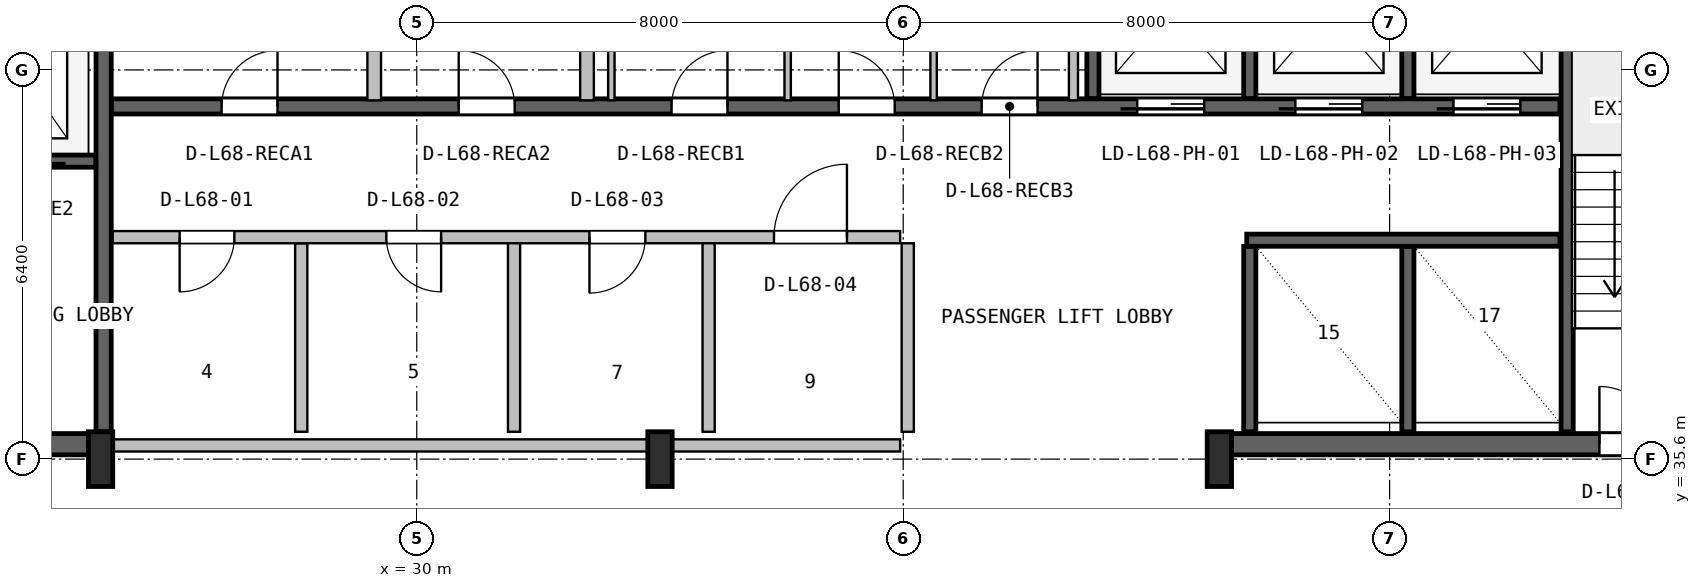
"""IFC4 building model, lengths in metres.
Left out: names, types, materials, properties, quantities, classifications, styles, units other than length and angle.
Written with IfcOpenShell. Run it as: python <this file> out.ifc"""

import sys

from ifc_helpers import new_model, si_unit, direction, frame, frame_2d, origin, origin_2d, place, context, subcontext, project, spatial, rectangle, i_section, extrude, source, transform, mapped, element, fill, save


model = new_model("IFC4")
c1 = context("Model", 3, precision=1e-05, world=origin(), true_north=direction((0.0, 1.0)))
c2 = subcontext(c1, "Body", "Model", "MODEL_VIEW")
j1 = project(units=[si_unit("LENGTHUNIT", "METRE"), si_unit("PLANEANGLEUNIT", "RADIAN")], contexts=[c1])
p1 = place(None, origin())
s1 = spatial("IfcSite", under=j1, at=p1, CompositionType="ELEMENT")
p2 = place(p1, origin())
s2 = spatial("IfcBuilding", under=s1, at=p2, CompositionType="ELEMENT")
p3 = place(p2, frame((0.0, 0.0, 273.6)))
s3 = spatial("IfcBuildingStorey", under=s2, at=p3, CompositionType="ELEMENT", Elevation=273.6)
p4 = place(p3, frame((15.67, 35.845, 0.0), z_axis=(0.0, 0.0, 1.0), x_axis=(1.0, 0.0, 0.0)))
e1 = element("IfcWall", 1, at=p4, inside=s3, PredefinedType="SHEAR", context=c2, shape_type="SweptSolid", body=[
    extrude(rectangle(XDim=9.13, YDim=0.35, at=frame_2d((4.565, 0.0))), origin(), (0.0, 0.0, 1.0), 3.55),
])
p5 = place(p4, frame((5.4, 0.0, 0.0)))
e2 = element("IfcOpeningElement", 2, at=p5, cuts=e1, PredefinedType="OPENING", context=c2, shape_type="SweptSolid", body=[
    extrude(rectangle(XDim=1.0, YDim=2.1, at=frame_2d((0.5, 1.05))), frame((0.0, 0.185, 0.0), z_axis=(0.0, -1.0, 0.0), x_axis=(1.0, 0.0, 0.0)), (0.0, 0.0, 1.0), 0.37),
])
p6 = place(p3, frame((43.2, 35.845, 0.0), z_axis=(0.0, 0.0, 1.0), x_axis=(1.0, 0.0, 0.0)))
e3 = element("IfcWall", 3, at=p6, inside=s3, PredefinedType="SHEAR", context=c2, shape_type="SweptSolid", body=[
    extrude(rectangle(XDim=9.13, YDim=0.35, at=frame_2d((4.565, 0.0))), origin(), (0.0, 0.0, 1.0), 3.55),
])
p7 = place(p6, frame((6.25, 0.0, 0.0)))
e4 = element("IfcOpeningElement", 4, at=p7, cuts=e3, PredefinedType="OPENING", context=c2, shape_type="SweptSolid", body=[
    extrude(rectangle(XDim=0.95, YDim=2.1, at=frame_2d((0.475, 1.05))), frame((0.0, 0.185, 0.0), z_axis=(0.0, -1.0, 0.0), x_axis=(1.0, 0.0, 0.0)), (0.0, 0.0, 1.0), 0.37),
])
m1 = source(origin(), c2, "Body", "SweptSolid", [
    extrude(i_section(OverallWidth=0.4, OverallDepth=0.9, WebThickness=0.016, FlangeThickness=0.028, FilletRadius=0.016, at=origin_2d()), origin(), (0.0, 0.0, 1.0), 3.8),
])
for number, where, z_axis, x_axis in (
    (5, (24.8, 35.6, 0.0), (0.0, 0.0, 1.0), (1.0, 0.0, 0.0)),
    (6, (34.0, 35.6, 0.0), (0.0, 0.0, 1.0), (1.0, 0.0, 0.0)),
    (7, (43.2, 35.6, 0.0), (0.0, 0.0, 1.0), (1.0, 0.0, 0.0)),
):
    element("IfcColumn", number, at=place(p3, frame(where, z_axis=z_axis, x_axis=x_axis)), inside=s3, PredefinedType="COLUMN", context=c2, shape_type="MappedRepresentation", body=[
        mapped(m1, transform((0.0, 0.0, 0.0), x_axis=(1.0, 0.0, 0.0), y_axis=(0.0, 1.0, 0.0), z_axis=(0.0, 0.0, 1.0), scale=1.0)),
    ])
p8 = place(p3, frame((24.85, 36.05, 0.0), z_axis=(0.0, 0.0, 1.0), x_axis=(0.0, 1.0, 0.0)))
e8 = element("IfcWall", 8, at=p8, inside=s3, PredefinedType="SHEAR", context=c2, shape_type="SweptSolid", body=[
    extrude(rectangle(XDim=10.45, YDim=0.25, at=frame_2d((5.225, 0.0))), origin(), (0.0, 0.0, 1.0), 3.55),
])
p9 = place(p3, frame((19.2, 40.5, 0.0), z_axis=(0.0, 0.0, 1.0), x_axis=(1.0, 0.0, 0.0)))
e9 = element("IfcWall", 9, at=p9, inside=s3, PredefinedType="SHEAR", context=c2, shape_type="SweptSolid", body=[
    extrude(rectangle(XDim=5.52, YDim=0.2, at=frame_2d((2.76, 0.0))), origin(), (0.0, 0.0, 1.0), 3.55),
])
p10 = place(p9, frame((1.05, 0.0, 0.0)))
e10 = element("IfcOpeningElement", 10, at=p10, cuts=e9, PredefinedType="OPENING", context=c2, shape_type="SweptSolid", body=[
    extrude(rectangle(XDim=1.1, YDim=2.18, at=frame_2d((0.55, 1.09))), frame((0.0, 0.11, 0.0), z_axis=(0.0, -1.0, 0.0), x_axis=(1.0, 0.0, 0.0)), (0.0, 0.0, 1.0), 0.22),
])
p11 = place(p9, frame((3.65, 0.0, 0.0)))
e11 = element("IfcOpeningElement", 11, at=p11, cuts=e9, PredefinedType="OPENING", context=c2, shape_type="SweptSolid", body=[
    extrude(rectangle(XDim=1.1, YDim=2.18, at=frame_2d((0.55, 1.09))), frame((0.0, 0.11, 0.0), z_axis=(0.0, -1.0, 0.0), x_axis=(1.0, 0.0, 0.0)), (0.0, 0.0, 1.0), 0.22),
])
p12 = place(p3, frame((48.92, 36.05, 0.0), z_axis=(0.0, 0.0, 1.0), x_axis=(0.0, 1.0, 0.0)))
e12 = element("IfcWall", 12, at=p12, inside=s3, PredefinedType="SHEAR", context=c2, shape_type="SweptSolid", body=[
    extrude(rectangle(XDim=10.5, YDim=0.2, at=frame_2d((5.25, 0.0))), origin(), (0.0, 0.0, 1.0), 3.55),
])
p13 = place(p3, frame((24.98, 41.4, 0.0), z_axis=(0.0, 0.0, 1.0), x_axis=(1.0, 0.0, 0.0)))
e13 = element("IfcWall", 13, at=p13, inside=s3, PredefinedType="SHEAR", context=c2, shape_type="SweptSolid", body=[
    extrude(rectangle(XDim=23.82, YDim=0.25, at=frame_2d((11.91, 0.0))), origin(), (0.0, 0.0, 1.0), 3.55),
])
p14 = place(p13, frame((16.87, 0.0, 0.0)))
e14 = element("IfcOpeningElement", 14, at=p14, cuts=e13, PredefinedType="OPENING", context=c2, shape_type="SweptSolid", body=[
    extrude(rectangle(XDim=1.1, YDim=2.18, at=frame_2d((0.55, 1.09))), frame((0.0, 0.135, 0.0), z_axis=(0.0, -1.0, 0.0), x_axis=(1.0, 0.0, 0.0)), (0.0, 0.0, 1.0), 0.27),
])
p15 = place(p13, frame((19.47, 0.0, 0.0)))
e15 = element("IfcOpeningElement", 15, at=p15, cuts=e13, PredefinedType="OPENING", context=c2, shape_type="SweptSolid", body=[
    extrude(rectangle(XDim=1.1, YDim=2.18, at=frame_2d((0.55, 1.09))), frame((0.0, 0.135, 0.0), z_axis=(0.0, -1.0, 0.0), x_axis=(1.0, 0.0, 0.0)), (0.0, 0.0, 1.0), 0.27),
])
p16 = place(p13, frame((22.07, 0.0, 0.0)))
e16 = element("IfcOpeningElement", 16, at=p16, cuts=e13, PredefinedType="OPENING", context=c2, shape_type="SweptSolid", body=[
    extrude(rectangle(XDim=1.1, YDim=2.18, at=frame_2d((0.55, 1.09))), frame((0.0, 0.135, 0.0), z_axis=(0.0, -1.0, 0.0), x_axis=(1.0, 0.0, 0.0)), (0.0, 0.0, 1.0), 0.27),
])
p17 = place(p13, frame((1.81, 0.0, 0.0)))
e17 = element("IfcOpeningElement", 17, at=p17, cuts=e13, PredefinedType="OPENING", context=c2, shape_type="SweptSolid", body=[
    extrude(rectangle(XDim=0.92, YDim=2.08, at=frame_2d((0.46, 1.04))), frame((0.0, 0.135, 0.0), z_axis=(0.0, -1.0, 0.0), x_axis=(1.0, 0.0, 0.0)), (0.0, 0.0, 1.0), 0.27),
])
p18 = place(p13, frame((5.71, 0.0, 0.0)))
e18 = element("IfcOpeningElement", 18, at=p18, cuts=e13, PredefinedType="OPENING", context=c2, shape_type="SweptSolid", body=[
    extrude(rectangle(XDim=0.92, YDim=2.08, at=frame_2d((0.46, 1.04))), frame((0.0, 0.135, 0.0), z_axis=(0.0, -1.0, 0.0), x_axis=(1.0, 0.0, 0.0)), (0.0, 0.0, 1.0), 0.27),
])
p19 = place(p13, frame((9.21, 0.0, 0.0)))
e19 = element("IfcOpeningElement", 19, at=p19, cuts=e13, PredefinedType="OPENING", context=c2, shape_type="SweptSolid", body=[
    extrude(rectangle(XDim=0.92, YDim=2.08, at=frame_2d((0.46, 1.04))), frame((0.0, 0.135, 0.0), z_axis=(0.0, -1.0, 0.0), x_axis=(1.0, 0.0, 0.0)), (0.0, 0.0, 1.0), 0.27),
])
p20 = place(p13, frame((11.96, 0.0, 0.0)))
e20 = element("IfcOpeningElement", 20, at=p20, cuts=e13, PredefinedType="OPENING", context=c2, shape_type="SweptSolid", body=[
    extrude(rectangle(XDim=0.92, YDim=2.08, at=frame_2d((0.46, 1.04))), frame((0.0, 0.135, 0.0), z_axis=(0.0, -1.0, 0.0), x_axis=(1.0, 0.0, 0.0)), (0.0, 0.0, 1.0), 0.27),
])
p21 = place(p13, frame((14.31, 0.0, 0.0)))
e21 = element("IfcOpeningElement", 21, at=p21, cuts=e13, PredefinedType="OPENING", context=c2, shape_type="SweptSolid", body=[
    extrude(rectangle(XDim=0.92, YDim=2.08, at=frame_2d((0.46, 1.04))), frame((0.0, 0.135, 0.0), z_axis=(0.0, -1.0, 0.0), x_axis=(1.0, 0.0, 0.0)), (0.0, 0.0, 1.0), 0.27),
])
p22 = place(p3, frame((41.12, 41.53, 0.0), z_axis=(0.0, 0.0, 1.0), x_axis=(0.0, 1.0, 0.0)))
e22 = element("IfcWall", 22, at=p22, inside=s3, PredefinedType="SHEAR", context=c2, shape_type="SweptSolid", body=[
    extrude(rectangle(XDim=5.02, YDim=0.2, at=frame_2d((2.51, 0.0))), origin(), (0.0, 0.0, 1.0), 3.55),
])
for number, where, z_axis, x_axis in (
    (23, (43.7, 41.53, 0.0), (0.0, 0.0, 1.0), (0.0, 1.0, 0.0)),
    (24, (46.3, 41.53, 0.0), (0.0, 0.0, 1.0), (0.0, 1.0, 0.0)),
):
    element("IfcWall", number, at=place(p3, frame(where, z_axis=z_axis, x_axis=x_axis)), inside=s3, PredefinedType="SHEAR", context=c2, shape_type="SweptSolid", body=[
        extrude(rectangle(XDim=2.87, YDim=0.2, at=frame_2d((1.435, 0.0))), origin(), (0.0, 0.0, 1.0), 3.55),
    ])
for number, where, z_axis, x_axis in (
    (25, (43.7, 36.05, 0.0), (0.0, 0.0, 1.0), (0.0, 1.0, 0.0)),
    (26, (46.3, 36.05, 0.0), (0.0, 0.0, 1.0), (0.0, 1.0, 0.0)),
):
    element("IfcWall", number, at=place(p3, frame(where, z_axis=z_axis, x_axis=x_axis)), inside=s3, PredefinedType="SHEAR", context=c2, shape_type="SweptSolid", body=[
        extrude(rectangle(XDim=3.05, YDim=0.2, at=frame_2d((1.525, 0.0))), origin(), (0.0, 0.0, 1.0), 3.55),
    ])
p23 = place(p3, frame((43.65, 39.2, 0.0), z_axis=(0.0, 0.0, 1.0), x_axis=(1.0, 0.0, 0.0)))
e27 = element("IfcWall", 27, at=p23, inside=s3, PredefinedType="SHEAR", context=c2, shape_type="SweptSolid", body=[
    extrude(rectangle(XDim=5.15, YDim=0.2, at=frame_2d((2.575, 0.0))), origin(), (0.0, 0.0, 1.0), 3.55),
])
p24 = place(p3, frame((25.0, 35.825, 0.0), z_axis=(0.0, 0.0, 1.0), x_axis=(1.0, 0.0, 0.0)))
e28 = element("IfcWall", 28, at=p24, inside=s3, PredefinedType="SOLIDWALL", context=c2, shape_type="SweptSolid", body=[
    extrude(rectangle(XDim=12.95, YDim=0.2, at=frame_2d((6.475, 0.0))), origin(), (0.0, 0.0, 1.0), 2.575),
])
p25 = place(p3, frame((28.1, 36.05, 0.0), z_axis=(0.0, 0.0, 1.0), x_axis=(0.0, 1.0, 0.0)))
e29 = element("IfcWall", 29, at=p25, inside=s3, PredefinedType="PLUMBINGWALL", context=c2, shape_type="SweptSolid", body=[
    extrude(rectangle(XDim=3.1, YDim=0.2, at=frame_2d((1.55, 0.0))), origin(), (0.0, 0.0, 1.0), 3.53),
])
p26 = place(p3, frame((25.0, 39.25, 0.0), z_axis=(0.0, 0.0, 1.0), x_axis=(1.0, 0.0, 0.0)))
e30 = element("IfcWall", 30, at=p26, inside=s3, PredefinedType="SOLIDWALL", context=c2, shape_type="SweptSolid", body=[
    extrude(rectangle(XDim=12.95, YDim=0.2, at=frame_2d((6.475, 0.0))), origin(), (0.0, 0.0, 1.0), 3.53),
])
p27 = place(p26, frame((1.1, 0.0, 0.0)))
e31 = element("IfcOpeningElement", 31, at=p27, cuts=e30, PredefinedType="OPENING", context=c2, shape_type="SweptSolid", body=[
    extrude(rectangle(XDim=0.9, YDim=2.06, at=frame_2d((0.45, 1.03))), frame((0.0, 0.11, 0.0), z_axis=(0.0, -1.0, 0.0), x_axis=(1.0, 0.0, 0.0)), (0.0, 0.0, 1.0), 0.22),
])
p28 = place(p26, frame((4.5, 0.0, 0.0)))
e32 = element("IfcOpeningElement", 32, at=p28, cuts=e30, PredefinedType="OPENING", context=c2, shape_type="SweptSolid", body=[
    extrude(rectangle(XDim=0.9, YDim=2.06, at=frame_2d((0.45, 1.03))), frame((0.0, 0.11, 0.0), z_axis=(0.0, -1.0, 0.0), x_axis=(1.0, 0.0, 0.0)), (0.0, 0.0, 1.0), 0.22),
])
p29 = place(p26, frame((7.84, 0.0, 0.0)))
e33 = element("IfcOpeningElement", 33, at=p29, cuts=e30, PredefinedType="OPENING", context=c2, shape_type="SweptSolid", body=[
    extrude(rectangle(XDim=0.92, YDim=2.08, at=frame_2d((0.46, 1.04))), frame((0.0, 0.11, 0.0), z_axis=(0.0, -1.0, 0.0), x_axis=(1.0, 0.0, 0.0)), (0.0, 0.0, 1.0), 0.22),
])
p30 = place(p26, frame((10.875, 0.0, 0.0)))
e34 = element("IfcOpeningElement", 34, at=p30, cuts=e30, PredefinedType="OPENING", context=c2, shape_type="SweptSolid", body=[
    extrude(rectangle(XDim=1.2, YDim=2.1, at=frame_2d((0.6, 1.05))), frame((0.0, 0.11, 0.0), z_axis=(0.0, -1.0, 0.0), x_axis=(1.0, 0.0, 0.0)), (0.0, 0.0, 1.0), 0.22),
])
p31 = place(p3, frame((31.6, 36.05, 0.0), z_axis=(0.0, 0.0, 1.0), x_axis=(0.0, 1.0, 0.0)))
e35 = element("IfcWall", 35, at=p31, inside=s3, PredefinedType="PLUMBINGWALL", context=c2, shape_type="SweptSolid", body=[
    extrude(rectangle(XDim=3.1, YDim=0.2, at=frame_2d((1.55, 0.0))), origin(), (0.0, 0.0, 1.0), 3.53),
])
for number, where, z_axis, x_axis in (
    (36, (34.8, 36.05, 0.0), (0.0, 0.0, 1.0), (0.0, 1.0, 0.0)),
    (37, (38.075, 36.05, 0.0), (0.0, 0.0, 1.0), (0.0, 1.0, 0.0)),
):
    element("IfcWall", number, at=place(p3, frame(where, z_axis=z_axis, x_axis=x_axis)), inside=s3, PredefinedType="SOLIDWALL", context=c2, shape_type="SweptSolid", body=[
        extrude(rectangle(XDim=3.1, YDim=0.2, at=frame_2d((1.55, 0.0))), origin(), (0.0, 0.0, 1.0), 3.53),
    ])
p32 = place(p3, frame((29.3, 41.5, 0.0), z_axis=(0.0, 0.0, 1.0), x_axis=(0.0, 1.0, 0.0)))
e38 = element("IfcWall", 38, at=p32, inside=s3, PredefinedType="PARTITIONING", context=c2, shape_type="SweptSolid", body=[
    extrude(rectangle(XDim=2.288, YDim=0.225, at=frame_2d((1.144, 0.0))), origin(), (0.0, 0.0, 1.0), 3.53),
])
p33 = place(p3, frame((32.8, 41.5, 0.0), z_axis=(0.0, 0.0, 1.0), x_axis=(0.0, 1.0, 0.0)))
e39 = element("IfcWall", 39, at=p33, inside=s3, PredefinedType="PARTITIONING", context=c2, shape_type="SweptSolid", body=[
    extrude(rectangle(XDim=5.02, YDim=0.225, at=frame_2d((2.51, 0.0))), origin(), (0.0, 0.0, 1.0), 3.53),
])
for number, where, z_axis, x_axis in (
    (40, (36.1, 41.5, 0.0), (0.0, 0.0, 1.0), (0.0, 1.0, 0.0)),
    (41, (33.2, 41.5, 0.0), (0.0, 0.0, 1.0), (0.0, 1.0, 0.0)),
    (42, (38.5, 41.5, 0.0), (0.0, 0.0, 1.0), (0.0, 1.0, 0.0)),
):
    element("IfcWall", number, at=place(p3, frame(where, z_axis=z_axis, x_axis=x_axis)), inside=s3, PredefinedType="PARTITIONING", context=c2, shape_type="SweptSolid", body=[
        extrude(rectangle(XDim=5.02, YDim=0.105, at=frame_2d((2.51, 0.0))), origin(), (0.0, 0.0, 1.0), 3.53),
    ])
p34 = place(p3, frame((40.8, 41.5, 0.0), z_axis=(0.0, 0.0, 1.0), x_axis=(0.0, 1.0, 0.0)))
e43 = element("IfcWall", 43, at=p34, inside=s3, PredefinedType="PARTITIONING", context=c2, shape_type="SweptSolid", body=[
    extrude(rectangle(XDim=5.02, YDim=0.15, at=frame_2d((2.51, 0.0))), origin(), (0.0, 0.0, 1.0), 3.53),
])
m2 = source(origin(), c2, "Body", "SweptSolid", [
    extrude(rectangle(XDim=0.95, YDim=2.1, at=frame_2d((0.475, 1.05))), frame((0.0, 0.025, 0.0), z_axis=(0.0, -1.0, 0.0), x_axis=(1.0, 0.0, 0.0)), (0.0, 0.0, 1.0), 0.05),
])
p35 = place(p7, origin())
e44 = element("IfcDoor", 44, at=p35, inside=s3, OperationType="SINGLE_SWING_LEFT", PredefinedType="DOOR", context=c2, shape_type="MappedRepresentation", body=[
    mapped(m2, transform((0.0, 0.0, 0.0), x_axis=(1.0, 0.0, 0.0), y_axis=(0.0, 1.0, 0.0), z_axis=(0.0, 0.0, 1.0), scale=1.0)),
])
fill(e4, e44)
m3 = source(origin(), c2, "Body", "SweptSolid", [
    extrude(rectangle(XDim=1.1, YDim=2.18, at=frame_2d((0.55, 1.09))), frame((0.0, 0.025, 0.0), z_axis=(0.0, -1.0, 0.0), x_axis=(1.0, 0.0, 0.0)), (0.0, 0.0, 1.0), 0.05),
])
p36 = place(p14, frame((1.1, 0.0, 0.0), z_axis=(0.0, 0.0, 1.0), x_axis=(-1.0, 0.0, 0.0)))
e45 = element("IfcDoor", 45, at=p36, inside=s3, OperationType="SLIDING_TO_LEFT", PredefinedType="DOOR", context=c2, shape_type="MappedRepresentation", body=[
    mapped(m3, transform((0.0, 0.0, 0.0), x_axis=(1.0, 0.0, 0.0), y_axis=(0.0, 1.0, 0.0), z_axis=(0.0, 0.0, 1.0), scale=1.0)),
])
fill(e14, e45)
p37 = place(p15, frame((1.1, 0.0, 0.0), z_axis=(0.0, 0.0, 1.0), x_axis=(-1.0, 0.0, 0.0)))
e46 = element("IfcDoor", 46, at=p37, inside=s3, OperationType="SLIDING_TO_LEFT", PredefinedType="DOOR", context=c2, shape_type="MappedRepresentation", body=[
    mapped(m3, transform((0.0, 0.0, 0.0), x_axis=(1.0, 0.0, 0.0), y_axis=(0.0, 1.0, 0.0), z_axis=(0.0, 0.0, 1.0), scale=1.0)),
])
fill(e15, e46)
p38 = place(p16, frame((1.1, 0.0, 0.0), z_axis=(0.0, 0.0, 1.0), x_axis=(-1.0, 0.0, 0.0)))
e47 = element("IfcDoor", 47, at=p38, inside=s3, OperationType="SLIDING_TO_LEFT", PredefinedType="DOOR", context=c2, shape_type="MappedRepresentation", body=[
    mapped(m3, transform((0.0, 0.0, 0.0), x_axis=(1.0, 0.0, 0.0), y_axis=(0.0, 1.0, 0.0), z_axis=(0.0, 0.0, 1.0), scale=1.0)),
])
fill(e16, e47)
m4 = source(origin(), c2, "Body", "SweptSolid", [
    extrude(rectangle(XDim=0.92, YDim=2.08, at=frame_2d((0.46, 1.04))), frame((0.0, 0.025, 0.0), z_axis=(0.0, -1.0, 0.0), x_axis=(1.0, 0.0, 0.0)), (0.0, 0.0, 1.0), 0.05),
])
p39 = place(p17, origin())
e48 = element("IfcDoor", 48, at=p39, inside=s3, OperationType="SINGLE_SWING_RIGHT", PredefinedType="DOOR", context=c2, shape_type="MappedRepresentation", body=[
    mapped(m4, transform((0.0, 0.0, 0.0), x_axis=(1.0, 0.0, 0.0), y_axis=(0.0, 1.0, 0.0), z_axis=(0.0, 0.0, 1.0), scale=1.0)),
])
fill(e17, e48)
p40 = place(p18, origin())
e49 = element("IfcDoor", 49, at=p40, inside=s3, OperationType="SINGLE_SWING_LEFT", PredefinedType="DOOR", context=c2, shape_type="MappedRepresentation", body=[
    mapped(m4, transform((0.0, 0.0, 0.0), x_axis=(1.0, 0.0, 0.0), y_axis=(0.0, 1.0, 0.0), z_axis=(0.0, 0.0, 1.0), scale=1.0)),
])
fill(e18, e49)
p41 = place(p19, origin())
e50 = element("IfcDoor", 50, at=p41, inside=s3, OperationType="SINGLE_SWING_RIGHT", PredefinedType="DOOR", context=c2, shape_type="MappedRepresentation", body=[
    mapped(m4, transform((0.0, 0.0, 0.0), x_axis=(1.0, 0.0, 0.0), y_axis=(0.0, 1.0, 0.0), z_axis=(0.0, 0.0, 1.0), scale=1.0)),
])
fill(e19, e50)
p42 = place(p20, origin())
e51 = element("IfcDoor", 51, at=p42, inside=s3, OperationType="SINGLE_SWING_LEFT", PredefinedType="DOOR", context=c2, shape_type="MappedRepresentation", body=[
    mapped(m4, transform((0.0, 0.0, 0.0), x_axis=(1.0, 0.0, 0.0), y_axis=(0.0, 1.0, 0.0), z_axis=(0.0, 0.0, 1.0), scale=1.0)),
])
fill(e20, e51)
p43 = place(p21, origin())
e52 = element("IfcDoor", 52, at=p43, inside=s3, OperationType="SINGLE_SWING_RIGHT", PredefinedType="DOOR", context=c2, shape_type="MappedRepresentation", body=[
    mapped(m4, transform((0.0, 0.0, 0.0), x_axis=(1.0, 0.0, 0.0), y_axis=(0.0, 1.0, 0.0), z_axis=(0.0, 0.0, 1.0), scale=1.0)),
])
fill(e21, e52)
m5 = source(origin(), c2, "Body", "SweptSolid", [
    extrude(rectangle(XDim=0.9, YDim=2.06, at=frame_2d((0.45, 1.03))), frame((0.0, 0.025, 0.0), z_axis=(0.0, -1.0, 0.0), x_axis=(1.0, 0.0, 0.0)), (0.0, 0.0, 1.0), 0.05),
])
p44 = place(p27, frame((0.9, 0.0, 0.0), z_axis=(0.0, 0.0, 1.0), x_axis=(-1.0, 0.0, 0.0)))
e53 = element("IfcDoor", 53, at=p44, inside=s3, OperationType="SINGLE_SWING_LEFT", PredefinedType="DOOR", context=c2, shape_type="MappedRepresentation", body=[
    mapped(m5, transform((0.0, 0.0, 0.0), x_axis=(1.0, 0.0, 0.0), y_axis=(0.0, 1.0, 0.0), z_axis=(0.0, 0.0, 1.0), scale=1.0)),
])
fill(e31, e53)
p45 = place(p28, frame((0.9, 0.0, 0.0), z_axis=(0.0, 0.0, 1.0), x_axis=(-1.0, 0.0, 0.0)))
e54 = element("IfcDoor", 54, at=p45, inside=s3, OperationType="SINGLE_SWING_RIGHT", PredefinedType="DOOR", context=c2, shape_type="MappedRepresentation", body=[
    mapped(m5, transform((0.0, 0.0, 0.0), x_axis=(1.0, 0.0, 0.0), y_axis=(0.0, 1.0, 0.0), z_axis=(0.0, 0.0, 1.0), scale=1.0)),
])
fill(e32, e54)
p46 = place(p29, frame((0.92, 0.0, 0.0), z_axis=(0.0, 0.0, 1.0), x_axis=(-1.0, 0.0, 0.0)))
e55 = element("IfcDoor", 55, at=p46, inside=s3, OperationType="SINGLE_SWING_LEFT", PredefinedType="DOOR", context=c2, shape_type="MappedRepresentation", body=[
    mapped(m4, transform((0.0, 0.0, 0.0), x_axis=(1.0, 0.0, 0.0), y_axis=(0.0, 1.0, 0.0), z_axis=(0.0, 0.0, 1.0), scale=1.0)),
])
fill(e33, e55)
m6 = source(origin(), c2, "Body", "SweptSolid", [
    extrude(rectangle(XDim=1.2, YDim=2.1, at=frame_2d((0.6, 1.05))), frame((0.0, 0.025, 0.0), z_axis=(0.0, -1.0, 0.0), x_axis=(1.0, 0.0, 0.0)), (0.0, 0.0, 1.0), 0.05),
])
p47 = place(p30, origin())
e56 = element("IfcDoor", 56, at=p47, inside=s3, OperationType="SINGLE_SWING_RIGHT", PredefinedType="DOOR", context=c2, shape_type="MappedRepresentation", body=[
    mapped(m6, transform((0.0, 0.0, 0.0), x_axis=(1.0, 0.0, 0.0), y_axis=(0.0, 1.0, 0.0), z_axis=(0.0, 0.0, 1.0), scale=1.0)),
])
fill(e34, e56)
save(model, sys.argv[1])
